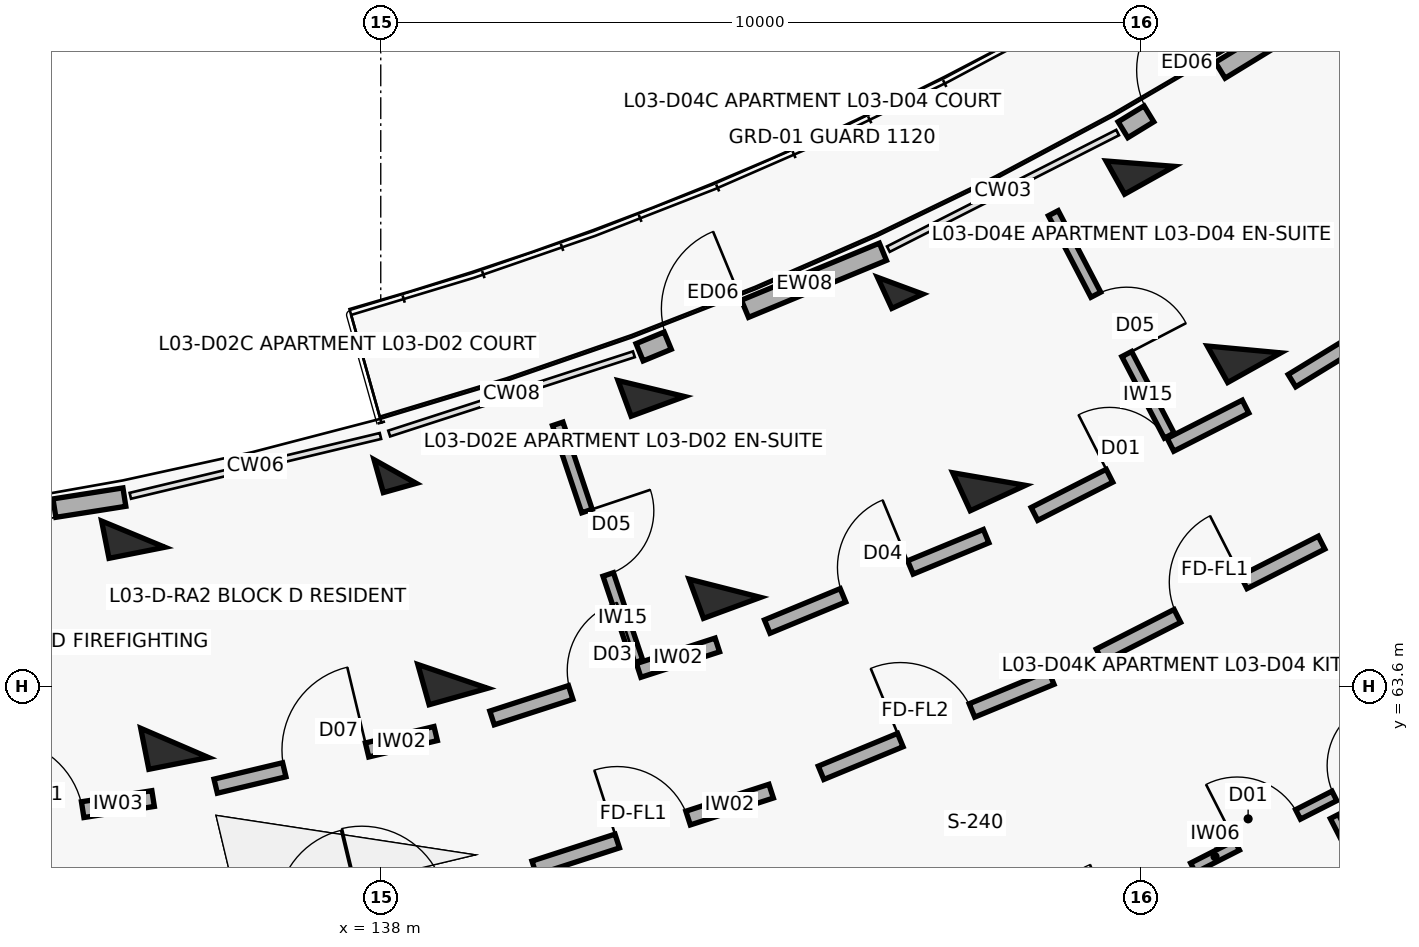
"""IFC4 building model, lengths in metres.
Left out: names, types, materials, properties, quantities, classifications, styles, units other than length and angle.
Written with IfcOpenShell. Run it as: python <this file> out.ifc"""

import sys

from ifc_helpers import new_model, si_unit, direction, frame, frame_2d, origin, origin_2d, place, context, subcontext, project, spatial, rectangle, extrude, element, fill, save


model = new_model("IFC4")
c1 = context("Model", 3, precision=1e-05, world=origin(), true_north=direction((0.0, 1.0)))
c2 = subcontext(c1, "Body", "Model", "MODEL_VIEW")
j1 = project(units=[si_unit("LENGTHUNIT", "METRE"), si_unit("PLANEANGLEUNIT", "RADIAN")], contexts=[c1])
p1 = place(None, origin())
s1 = spatial("IfcSite", under=j1, at=p1, CompositionType="ELEMENT")
p2 = place(p1, origin())
s2 = spatial("IfcBuilding", under=s1, at=p2, CompositionType="ELEMENT")
p3 = place(p2, frame((0.0, 0.0, 11.2)))
s3 = spatial("IfcBuildingStorey", under=s2, at=p3, CompositionType="ELEMENT", Elevation=11.2)
p4 = place(p3, frame((134.744, 65.599, 0.0), z_axis=(0.0, 0.0, 1.0), x_axis=(0.19423435122, -0.980955155349, 0.0)))
e1 = element("IfcColumn", 1, at=p4, inside=s3, PredefinedType="COLUMN", context=c2, shape_type="SweptSolid", body=[
    extrude(rectangle(XDim=0.5, YDim=0.75, at=origin_2d()), origin(), (0.0, 0.0, 1.0), 3.1),
])
p5 = place(p3, frame((135.288, 62.853, 0.0), z_axis=(0.0, 0.0, 1.0), x_axis=(0.19423435122, -0.980955155349, 0.0)))
e2 = element("IfcColumn", 2, at=p5, inside=s3, PredefinedType="COLUMN", context=c2, shape_type="SweptSolid", body=[
    extrude(rectangle(XDim=0.55, YDim=0.8, at=origin_2d()), origin(), (0.0, 0.0, 1.0), 3.1),
])
p6 = place(p3, frame((138.189, 66.423, 0.0), z_axis=(0.0, 0.0, 1.0), x_axis=(0.270600445976, -0.962691746426, 0.0)))
e3 = element("IfcColumn", 3, at=p6, inside=s3, PredefinedType="COLUMN", context=c2, shape_type="SweptSolid", body=[
    extrude(rectangle(XDim=0.45, YDim=0.45, at=origin_2d()), origin(), (0.0, 0.0, 1.0), 3.1),
])
p7 = place(p3, frame((138.947, 63.728, 0.0), z_axis=(0.0, 0.0, 1.0), x_axis=(0.270600445976, -0.962691746426, 0.0)))
e4 = element("IfcColumn", 4, at=p7, inside=s3, PredefinedType="COLUMN", context=c2, shape_type="SweptSolid", body=[
    extrude(rectangle(XDim=0.55, YDim=0.8, at=origin_2d()), origin(), (0.0, 0.0, 1.0), 3.1),
])
p8 = place(p3, frame((141.56, 67.515, 0.0), z_axis=(0.0, 0.0, 1.0), x_axis=(0.345298198999, -0.93849302276, 0.0)))
e5 = element("IfcColumn", 5, at=p8, inside=s3, PredefinedType="COLUMN", context=c2, shape_type="SweptSolid", body=[
    extrude(rectangle(XDim=0.5, YDim=0.75, at=origin_2d()), origin(), (0.0, 0.0, 1.0), 3.1),
])
p9 = place(p3, frame((142.527, 64.887, 0.0), z_axis=(0.0, 0.0, 1.0), x_axis=(0.345298198999, -0.93849302276, 0.0)))
e6 = element("IfcColumn", 6, at=p9, inside=s3, PredefinedType="COLUMN", context=c2, shape_type="SweptSolid", body=[
    extrude(rectangle(XDim=0.55, YDim=0.8, at=origin_2d()), origin(), (0.0, 0.0, 1.0), 3.1),
])
p10 = place(p3, frame((144.834, 68.868, 0.0), z_axis=(0.0, 0.0, 1.0), x_axis=(0.417867073801, -0.908508177527, 0.0)))
e7 = element("IfcColumn", 7, at=p10, inside=s3, PredefinedType="COLUMN", context=c2, shape_type="SweptSolid", body=[
    extrude(rectangle(XDim=0.45, YDim=0.45, at=origin_2d()), origin(), (0.0, 0.0, 1.0), 3.1),
])
for number, where, z_axis, x_axis in (
    (8, (146.004, 66.324, 0.0), (0.0, 0.0, 1.0), (0.418, -0.909, 0.0)),
    (9, (148.461, 60.982, 0.0), (0.0, 0.0, 1.0), (0.418, -0.909, 0.0)),
):
    element("IfcColumn", number, at=place(p3, frame(where, z_axis=z_axis, x_axis=x_axis)), inside=s3, PredefinedType="COLUMN", context=c2, shape_type="SweptSolid", body=[
        extrude(rectangle(XDim=0.55, YDim=0.8, at=origin_2d()), origin(), (0.0, 0.0, 1.0), 3.1),
    ])
p11 = place(p3, frame((147.992, 70.474, 0.0), z_axis=(0.0, 0.0, 1.0), x_axis=(0.487859659139, -0.87292207727, 0.0)))
e10 = element("IfcColumn", 10, at=p11, inside=s3, PredefinedType="COLUMN", context=c2, shape_type="SweptSolid", body=[
    extrude(rectangle(XDim=0.5, YDim=0.75, at=origin_2d()), origin(), (0.0, 0.0, 1.0), 3.1),
])
p12 = place(p3, frame((149.358, 68.03, 0.0), z_axis=(0.0, 0.0, 1.0), x_axis=(0.487859659139, -0.87292207727, 0.0)))
e11 = element("IfcColumn", 11, at=p12, inside=s3, PredefinedType="COLUMN", context=c2, shape_type="SweptSolid", body=[
    extrude(rectangle(XDim=0.55, YDim=0.8, at=origin_2d()), origin(), (0.0, 0.0, 1.0), 3.1),
])
p13 = place(p3, frame((131.206, 65.548, 0.0), z_axis=(0.0, 0.0, 1.0), x_axis=(0.987825183084, 0.155568016203, 0.0)))
e12 = element("IfcWall", 12, at=p13, inside=s3, PredefinedType="SOLIDWALL", context=c2, shape_type="SweptSolid", body=[
    extrude(rectangle(XDim=3.464, YDim=0.245, at=frame_2d((1.732, 0.0))), origin(), (0.0, 0.0, 1.0), 2.25),
])
p14 = place(p13, frame((0.932, 0.0, 0.32)))
e13 = element("IfcOpeningElement", 13, at=p14, cuts=e12, PredefinedType="OPENING", context=c2, shape_type="SweptSolid", body=[
    extrude(rectangle(XDim=1.6, YDim=1.5, at=frame_2d((0.8, 0.75))), frame((0.0, 0.133, 0.0), z_axis=(0.0, -1.0, 0.0), x_axis=(1.0, 0.0, 0.0)), (0.0, 0.0, 1.0), 0.265),
])
p15 = place(p3, frame((141.406, 67.992, 0.0), z_axis=(0.0, 0.0, 1.0), x_axis=(0.924221949388, 0.381855716561, 0.0)))
e14 = element("IfcWall", 14, at=p15, inside=s3, PredefinedType="SOLIDWALL", context=c2, shape_type="SweptSolid", body=[
    extrude(rectangle(XDim=3.463, YDim=0.245, at=frame_2d((1.732, 0.0))), origin(), (0.0, 0.0, 1.0), 2.25),
])
p16 = place(p15, frame((0.4, 0.0, 0.0)))
e15 = element("IfcOpeningElement", 15, at=p16, cuts=e14, PredefinedType="OPENING", context=c2, shape_type="SweptSolid", body=[
    extrude(rectangle(XDim=1.1, YDim=2.15, at=frame_2d((0.55, 1.075))), frame((0.0, 0.133, 0.0), z_axis=(0.0, -1.0, 0.0), x_axis=(1.0, 0.0, 0.0)), (0.0, 0.0, 1.0), 0.265),
])
p17 = place(p3, frame((147.765, 70.921, 0.0), z_axis=(0.0, 0.0, 1.0), x_axis=(0.85310231885, 0.521743647371, 0.0)))
e16 = element("IfcWall", 16, at=p17, inside=s3, PredefinedType="SOLIDWALL", context=c2, shape_type="SweptSolid", body=[
    extrude(rectangle(XDim=3.464, YDim=0.245, at=frame_2d((1.732, 0.0))), origin(), (0.0, 0.0, 1.0), 2.25),
])
p18 = place(p17, frame((0.4, 0.0, 0.0)))
e17 = element("IfcOpeningElement", 17, at=p18, cuts=e16, PredefinedType="OPENING", context=c2, shape_type="SweptSolid", body=[
    extrude(rectangle(XDim=1.1, YDim=2.15, at=frame_2d((0.55, 1.075))), frame((0.0, 0.133, 0.0), z_axis=(0.0, -1.0, 0.0), x_axis=(1.0, 0.0, 0.0)), (0.0, 0.0, 1.0), 0.265),
])
p19 = place(p3, frame((132.065, 61.657, 0.0), z_axis=(0.0, 0.0, 1.0), x_axis=(0.987816121487, 0.155625544594, 0.0)))
e18 = element("IfcWall", 18, at=p19, inside=s3, PredefinedType="SOLIDWALL", context=c2, shape_type="SweptSolid", body=[
    extrude(rectangle(XDim=2.976, YDim=0.21, at=frame_2d((1.488, 0.0))), origin(), (0.0, 0.0, 1.0), 2.08),
])
p20 = place(p19, frame((0.938, 0.0, 0.0)))
e19 = element("IfcOpeningElement", 19, at=p20, cuts=e18, PredefinedType="OPENING", context=c2, shape_type="SweptSolid", body=[
    extrude(rectangle(XDim=1.1, YDim=2.15, at=frame_2d((0.55, 1.075))), frame((0.0, 0.115, 0.0), z_axis=(0.0, -1.0, 0.0), x_axis=(1.0, 0.0, 0.0)), (0.0, 0.0, 1.0), 0.23),
])
p21 = place(p3, frame((135.828, 62.283, 0.0), z_axis=(0.0, 0.0, 1.0), x_axis=(0.972558314217, 0.232659247501, 0.0)))
e20 = element("IfcWall", 20, at=p21, inside=s3, PredefinedType="SOLIDWALL", context=c2, shape_type="SweptSolid", body=[
    extrude(rectangle(XDim=2.976, YDim=0.19, at=frame_2d((1.488, 0.0))), origin(), (0.0, 0.0, 1.0), 2.08),
])
p22 = place(p21, frame((0.928, 0.0, 0.0)))
e21 = element("IfcOpeningElement", 21, at=p22, cuts=e20, PredefinedType="OPENING", context=c2, shape_type="SweptSolid", body=[
    extrude(rectangle(XDim=1.12, YDim=2.15, at=frame_2d((0.56, 1.075))), frame((0.0, 0.105, 0.0), z_axis=(0.0, -1.0, 0.0), x_axis=(1.0, 0.0, 0.0)), (0.0, 0.0, 1.0), 0.21),
])
p23 = place(p3, frame((140.019, 61.208, 0.0), z_axis=(0.0, 0.0, 1.0), x_axis=(0.951323803878, 0.308193154005, 0.0)))
e22 = element("IfcWall", 22, at=p23, inside=s3, PredefinedType="SOLIDWALL", context=c2, shape_type="SweptSolid", body=[
    extrude(rectangle(XDim=3.277, YDim=0.19, at=frame_2d((1.639, 0.0))), origin(), (0.0, 0.0, 1.0), 2.08),
])
p24 = place(p23, frame((1.148, 0.0, 0.0)))
e23 = element("IfcOpeningElement", 23, at=p24, cuts=e22, PredefinedType="OPENING", context=c2, shape_type="SweptSolid", body=[
    extrude(rectangle(XDim=0.98, YDim=2.15, at=frame_2d((0.49, 1.075))), frame((0.0, 0.105, 0.0), z_axis=(0.0, -1.0, 0.0), x_axis=(1.0, 0.0, 0.0)), (0.0, 0.0, 1.0), 0.21),
])
p25 = place(p3, frame((139.464, 63.181, 0.0), z_axis=(0.0, 0.0, 1.0), x_axis=(0.951336474448, 0.308154040027, 0.0)))
e24 = element("IfcWall", 24, at=p25, inside=s3, PredefinedType="SOLIDWALL", context=c2, shape_type="SweptSolid", body=[
    extrude(rectangle(XDim=3.116, YDim=0.19, at=frame_2d((1.558, 0.0))), origin(), (0.0, 0.0, 1.0), 2.08),
])
p26 = place(p25, frame((1.088, 0.0, 0.0)))
e25 = element("IfcOpeningElement", 25, at=p26, cuts=e24, PredefinedType="OPENING", context=c2, shape_type="SweptSolid", body=[
    extrude(rectangle(XDim=0.94, YDim=2.1, at=frame_2d((0.47, 1.05))), frame((0.0, 0.105, 0.0), z_axis=(0.0, -1.0, 0.0), x_axis=(1.0, 0.0, 0.0)), (0.0, 0.0, 1.0), 0.21),
])
p27 = place(p3, frame((140.328, 67.051, 0.0), z_axis=(0.0, 0.0, 1.0), x_axis=(0.317825321803, -0.948149284038, 0.0)))
e26 = element("IfcWall", 26, at=p27, inside=s3, PredefinedType="PARTITIONING", context=c2, shape_type="SweptSolid", body=[
    extrude(rectangle(XDim=3.3, YDim=0.145, at=frame_2d((1.65, 0.0))), origin(), (0.0, 0.0, 1.0), 2.08),
])
p28 = place(p27, frame((1.21, 0.0, 0.0)))
e27 = element("IfcOpeningElement", 27, at=p28, cuts=e26, PredefinedType="OPENING", context=c2, shape_type="SweptSolid", body=[
    extrude(rectangle(XDim=0.88, YDim=2.1, at=frame_2d((0.44, 1.05))), frame((0.0, 0.083, 0.0), z_axis=(0.0, -1.0, 0.0), x_axis=(1.0, 0.0, 0.0)), (0.0, 0.0, 1.0), 0.165),
])
p29 = place(p3, frame((143.793, 62.459, 0.0), z_axis=(0.0, 0.0, 1.0), x_axis=(0.924214561665, 0.381873596896, 0.0)))
e28 = element("IfcWall", 28, at=p29, inside=s3, PredefinedType="SOLIDWALL", context=c2, shape_type="SweptSolid", body=[
    extrude(rectangle(XDim=3.277, YDim=0.19, at=frame_2d((1.639, 0.0))), origin(), (0.0, 0.0, 1.0), 2.08),
])
p30 = place(p29, frame((1.128, 0.0, 0.0)))
e29 = element("IfcOpeningElement", 29, at=p30, cuts=e28, PredefinedType="OPENING", context=c2, shape_type="SweptSolid", body=[
    extrude(rectangle(XDim=1.02, YDim=2.15, at=frame_2d((0.51, 1.075))), frame((0.0, 0.105, 0.0), z_axis=(0.0, -1.0, 0.0), x_axis=(1.0, 0.0, 0.0)), (0.0, 0.0, 1.0), 0.21),
])
p31 = place(p3, frame((143.085, 64.383, 0.0), z_axis=(0.0, 0.0, 1.0), x_axis=(0.924213340202, 0.381876553081, 0.0)))
e30 = element("IfcWall", 30, at=p31, inside=s3, PredefinedType="SOLIDWALL", context=c2, shape_type="SweptSolid", body=[
    extrude(rectangle(XDim=3.116, YDim=0.19, at=frame_2d((1.558, 0.0))), origin(), (0.0, 0.0, 1.0), 2.08),
])
p32 = place(p31, frame((1.078, 0.0, 0.0)))
e31 = element("IfcOpeningElement", 31, at=p32, cuts=e30, PredefinedType="OPENING", context=c2, shape_type="SweptSolid", body=[
    extrude(rectangle(XDim=0.96, YDim=2.1, at=frame_2d((0.48, 1.05))), frame((0.0, 0.105, 0.0), z_axis=(0.0, -1.0, 0.0), x_axis=(1.0, 0.0, 0.0)), (0.0, 0.0, 1.0), 0.21),
])
p33 = place(p3, frame((147.457, 64.003, 0.0), z_axis=(0.0, 0.0, 1.0), x_axis=(0.891412167565, 0.45319349898, 0.0)))
e32 = element("IfcWall", 32, at=p33, inside=s3, PredefinedType="SOLIDWALL", context=c2, shape_type="SweptSolid", body=[
    extrude(rectangle(XDim=3.277, YDim=0.19, at=frame_2d((1.639, 0.0))), origin(), (0.0, 0.0, 1.0), 2.08),
])
p34 = place(p33, frame((1.148, 0.0, 0.0)))
e33 = element("IfcOpeningElement", 33, at=p34, cuts=e32, PredefinedType="OPENING", context=c2, shape_type="SweptSolid", body=[
    extrude(rectangle(XDim=0.98, YDim=2.15, at=frame_2d((0.49, 1.075))), frame((0.0, 0.105, 0.0), z_axis=(0.0, -1.0, 0.0), x_axis=(1.0, 0.0, 0.0)), (0.0, 0.0, 1.0), 0.21),
])
p35 = place(p3, frame((146.6, 65.865, 0.0), z_axis=(0.0, 0.0, 1.0), x_axis=(0.891414101388, 0.453189695212, 0.0)))
e34 = element("IfcWall", 34, at=p35, inside=s3, PredefinedType="SOLIDWALL", context=c2, shape_type="SweptSolid", body=[
    extrude(rectangle(XDim=3.116, YDim=0.19, at=frame_2d((1.558, 0.0))), origin(), (0.0, 0.0, 1.0), 2.08),
])
p36 = place(p35, frame((1.108, 0.0, 0.0)))
e35 = element("IfcOpeningElement", 35, at=p36, cuts=e34, PredefinedType="OPENING", context=c2, shape_type="SweptSolid", body=[
    extrude(rectangle(XDim=0.9, YDim=2.1, at=frame_2d((0.45, 1.05))), frame((0.0, 0.105, 0.0), z_axis=(0.0, -1.0, 0.0), x_axis=(1.0, 0.0, 0.0)), (0.0, 0.0, 1.0), 0.21),
])
p37 = place(p3, frame((146.849, 69.822, 0.0), z_axis=(0.0, 0.0, 1.0), x_axis=(0.462242343884, -0.886753638572, 0.0)))
e36 = element("IfcWall", 36, at=p37, inside=s3, PredefinedType="PARTITIONING", context=c2, shape_type="SweptSolid", body=[
    extrude(rectangle(XDim=3.3, YDim=0.145, at=frame_2d((1.65, 0.0))), origin(), (0.0, 0.0, 1.0), 2.08),
])
p38 = place(p37, frame((1.21, 0.0, 0.0)))
e37 = element("IfcOpeningElement", 37, at=p38, cuts=e36, PredefinedType="OPENING", context=c2, shape_type="SweptSolid", body=[
    extrude(rectangle(XDim=0.88, YDim=2.1, at=frame_2d((0.44, 1.05))), frame((0.0, 0.083, 0.0), z_axis=(0.0, -1.0, 0.0), x_axis=(1.0, 0.0, 0.0)), (0.0, 0.0, 1.0), 0.165),
])
p39 = place(p3, frame((148.687, 61.209, 0.0), z_axis=(0.0, 0.0, 1.0), x_axis=(0.891396224028, 0.453224857866, 0.0)))
e38 = element("IfcWall", 38, at=p39, inside=s3, PredefinedType="PARTITIONING", context=c2, shape_type="SweptSolid", body=[
    extrude(rectangle(XDim=3.617, YDim=0.14, at=frame_2d((1.808, 0.0))), origin(), (0.0, 0.0, 1.0), 2.08),
])
p40 = place(p39, frame((0.65, 0.0, 0.0)))
e39 = element("IfcOpeningElement", 39, at=p40, cuts=e38, PredefinedType="OPENING", context=c2, shape_type="SweptSolid", body=[
    extrude(rectangle(XDim=0.9, YDim=2.1, at=frame_2d((0.45, 1.05))), frame((0.0, 0.08, 0.0), z_axis=(0.0, -1.0, 0.0), x_axis=(1.0, 0.0, 0.0)), (0.0, 0.0, 1.0), 0.16),
])
p41 = place(p39, frame((2.086, 0.0, 0.0)))
e40 = element("IfcOpeningElement", 40, at=p41, cuts=e38, PredefinedType="OPENING", context=c2, shape_type="SweptSolid", body=[
    extrude(rectangle(XDim=0.88, YDim=2.1, at=frame_2d((0.44, 1.05))), frame((0.0, 0.08, 0.0), z_axis=(0.0, -1.0, 0.0), x_axis=(1.0, 0.0, 0.0)), (0.0, 0.0, 1.0), 0.16),
])
p42 = place(p3, frame((150.547, 61.884, 0.0), z_axis=(0.0, 0.0, 1.0), x_axis=(0.455778725258, -0.89009311513, 0.0)))
e41 = element("IfcWall", 41, at=p42, inside=s3, PredefinedType="PARTITIONING", context=c2, shape_type="SweptSolid", body=[
    extrude(rectangle(XDim=5.05, YDim=0.12, at=frame_2d((2.525, 0.0))), origin(), (0.0, 0.0, 1.0), 2.08),
])
p43 = place(p42, frame((2.08, 0.0, 0.0)))
e42 = element("IfcOpeningElement", 42, at=p43, cuts=e41, PredefinedType="OPENING", context=c2, shape_type="SweptSolid", body=[
    extrude(rectangle(XDim=0.89, YDim=2.1, at=frame_2d((0.445, 1.05))), frame((0.0, 0.07, 0.0), z_axis=(0.0, -1.0, 0.0), x_axis=(1.0, 0.0, 0.0)), (0.0, 0.0, 1.0), 0.14),
])
p44 = place(p3, frame((149.989, 67.619, 0.0), z_axis=(0.0, 0.0, 1.0), x_axis=(0.853121049608, 0.5217130195, 0.0)))
e43 = element("IfcWall", 43, at=p44, inside=s3, PredefinedType="SOLIDWALL", context=c2, shape_type="SweptSolid", body=[
    extrude(rectangle(XDim=3.116, YDim=0.19, at=frame_2d((1.558, 0.0))), origin(), (0.0, 0.0, 1.0), 2.08),
])
p45 = place(p44, frame((1.098, 0.0, 0.0)))
e44 = element("IfcOpeningElement", 44, at=p45, cuts=e43, PredefinedType="OPENING", context=c2, shape_type="SweptSolid", body=[
    extrude(rectangle(XDim=0.92, YDim=2.1, at=frame_2d((0.46, 1.05))), frame((0.0, 0.105, 0.0), z_axis=(0.0, -1.0, 0.0), x_axis=(1.0, 0.0, 0.0)), (0.0, 0.0, 1.0), 0.21),
])
p46 = place(p14, origin())
e45 = element("IfcWindow", 45, at=p46, inside=s3, PartitioningType="DOUBLE_PANEL_VERTICAL", PredefinedType="WINDOW", context=c2, shape_type="SweptSolid", body=[
    extrude(rectangle(XDim=1.6, YDim=1.5, at=frame_2d((0.8, 0.75))), frame((0.0, 0.03, 0.0), z_axis=(0.0, -1.0, 0.0), x_axis=(1.0, 0.0, 0.0)), (0.0, 0.0, 1.0), 0.06),
])
fill(e13, e45)
p47 = place(p16, origin())
e46 = element("IfcDoor", 46, at=p47, inside=s3, OperationType="SINGLE_SWING_RIGHT", PredefinedType="DOOR", context=c2, shape_type="SweptSolid", body=[
    extrude(rectangle(XDim=1.1, YDim=2.15, at=frame_2d((0.55, 1.075))), frame((0.0, 0.025, 0.0), z_axis=(0.0, -1.0, 0.0), x_axis=(1.0, 0.0, 0.0)), (0.0, 0.0, 1.0), 0.05),
])
fill(e15, e46)
p48 = place(p18, origin())
e47 = element("IfcDoor", 47, at=p48, inside=s3, OperationType="SINGLE_SWING_RIGHT", PredefinedType="DOOR", context=c2, shape_type="SweptSolid", body=[
    extrude(rectangle(XDim=1.1, YDim=2.15, at=frame_2d((0.55, 1.075))), frame((0.0, 0.025, 0.0), z_axis=(0.0, -1.0, 0.0), x_axis=(1.0, 0.0, 0.0)), (0.0, 0.0, 1.0), 0.05),
])
fill(e17, e47)
p49 = place(p20, origin())
e48 = element("IfcDoor", 48, at=p49, inside=s3, OperationType="SINGLE_SWING_LEFT", PredefinedType="DOOR", context=c2, shape_type="SweptSolid", body=[
    extrude(rectangle(XDim=1.1, YDim=2.15, at=frame_2d((0.55, 1.075))), frame((0.0, 0.025, 0.0), z_axis=(0.0, -1.0, 0.0), x_axis=(1.0, 0.0, 0.0)), (0.0, 0.0, 1.0), 0.05),
])
fill(e19, e48)
p50 = place(p22, origin())
e49 = element("IfcDoor", 49, at=p50, inside=s3, OperationType="SINGLE_SWING_RIGHT", PredefinedType="DOOR", context=c2, shape_type="SweptSolid", body=[
    extrude(rectangle(XDim=1.12, YDim=2.15, at=frame_2d((0.56, 1.075))), frame((0.0, 0.025, 0.0), z_axis=(0.0, -1.0, 0.0), x_axis=(1.0, 0.0, 0.0)), (0.0, 0.0, 1.0), 0.05),
])
fill(e21, e49)
p51 = place(p24, origin())
e50 = element("IfcDoor", 50, at=p51, inside=s3, OperationType="SINGLE_SWING_LEFT", PredefinedType="DOOR", context=c2, shape_type="SweptSolid", body=[
    extrude(rectangle(XDim=0.98, YDim=2.15, at=frame_2d((0.49, 1.075))), frame((0.0, 0.025, 0.0), z_axis=(0.0, -1.0, 0.0), x_axis=(1.0, 0.0, 0.0)), (0.0, 0.0, 1.0), 0.05),
])
fill(e23, e50)
p52 = place(p26, origin())
e51 = element("IfcDoor", 51, at=p52, inside=s3, OperationType="SINGLE_SWING_RIGHT", PredefinedType="DOOR", context=c2, shape_type="SweptSolid", body=[
    extrude(rectangle(XDim=0.94, YDim=2.1, at=frame_2d((0.47, 1.05))), frame((0.0, 0.025, 0.0), z_axis=(0.0, -1.0, 0.0), x_axis=(1.0, 0.0, 0.0)), (0.0, 0.0, 1.0), 0.05),
])
fill(e25, e51)
p53 = place(p28, origin())
e52 = element("IfcDoor", 52, at=p53, inside=s3, OperationType="SINGLE_SWING_LEFT", PredefinedType="DOOR", context=c2, shape_type="SweptSolid", body=[
    extrude(rectangle(XDim=0.88, YDim=2.1, at=frame_2d((0.44, 1.05))), frame((0.0, 0.025, 0.0), z_axis=(0.0, -1.0, 0.0), x_axis=(1.0, 0.0, 0.0)), (0.0, 0.0, 1.0), 0.05),
])
fill(e27, e52)
p54 = place(p30, origin())
e53 = element("IfcDoor", 53, at=p54, inside=s3, OperationType="SINGLE_SWING_LEFT", PredefinedType="DOOR", context=c2, shape_type="SweptSolid", body=[
    extrude(rectangle(XDim=1.02, YDim=2.15, at=frame_2d((0.51, 1.075))), frame((0.0, 0.025, 0.0), z_axis=(0.0, -1.0, 0.0), x_axis=(1.0, 0.0, 0.0)), (0.0, 0.0, 1.0), 0.05),
])
fill(e29, e53)
p55 = place(p32, origin())
e54 = element("IfcDoor", 54, at=p55, inside=s3, OperationType="SINGLE_SWING_RIGHT", PredefinedType="DOOR", context=c2, shape_type="SweptSolid", body=[
    extrude(rectangle(XDim=0.96, YDim=2.1, at=frame_2d((0.48, 1.05))), frame((0.0, 0.025, 0.0), z_axis=(0.0, -1.0, 0.0), x_axis=(1.0, 0.0, 0.0)), (0.0, 0.0, 1.0), 0.05),
])
fill(e31, e54)
p56 = place(p34, origin())
e55 = element("IfcDoor", 55, at=p56, inside=s3, OperationType="SINGLE_SWING_RIGHT", PredefinedType="DOOR", context=c2, shape_type="SweptSolid", body=[
    extrude(rectangle(XDim=0.98, YDim=2.15, at=frame_2d((0.49, 1.075))), frame((0.0, 0.025, 0.0), z_axis=(0.0, -1.0, 0.0), x_axis=(1.0, 0.0, 0.0)), (0.0, 0.0, 1.0), 0.05),
])
fill(e33, e55)
p57 = place(p36, origin())
e56 = element("IfcDoor", 56, at=p57, inside=s3, OperationType="SINGLE_SWING_LEFT", PredefinedType="DOOR", context=c2, shape_type="SweptSolid", body=[
    extrude(rectangle(XDim=0.9, YDim=2.1, at=frame_2d((0.45, 1.05))), frame((0.0, 0.025, 0.0), z_axis=(0.0, -1.0, 0.0), x_axis=(1.0, 0.0, 0.0)), (0.0, 0.0, 1.0), 0.05),
])
fill(e35, e56)
p58 = place(p38, origin())
e57 = element("IfcDoor", 57, at=p58, inside=s3, OperationType="SINGLE_SWING_RIGHT", PredefinedType="DOOR", context=c2, shape_type="SweptSolid", body=[
    extrude(rectangle(XDim=0.88, YDim=2.1, at=frame_2d((0.44, 1.05))), frame((0.0, 0.025, 0.0), z_axis=(0.0, -1.0, 0.0), x_axis=(1.0, 0.0, 0.0)), (0.0, 0.0, 1.0), 0.05),
])
fill(e37, e57)
p59 = place(p40, origin())
e58 = element("IfcDoor", 58, at=p59, inside=s3, OperationType="SINGLE_SWING_LEFT", PredefinedType="DOOR", context=c2, shape_type="SweptSolid", body=[
    extrude(rectangle(XDim=0.9, YDim=2.1, at=frame_2d((0.45, 1.05))), frame((0.0, 0.025, 0.0), z_axis=(0.0, -1.0, 0.0), x_axis=(1.0, 0.0, 0.0)), (0.0, 0.0, 1.0), 0.05),
])
fill(e39, e58)
p60 = place(p41, origin())
e59 = element("IfcDoor", 59, at=p60, inside=s3, OperationType="SINGLE_SWING_RIGHT", PredefinedType="DOOR", context=c2, shape_type="SweptSolid", body=[
    extrude(rectangle(XDim=0.88, YDim=2.1, at=frame_2d((0.44, 1.05))), frame((0.0, 0.025, 0.0), z_axis=(0.0, -1.0, 0.0), x_axis=(1.0, 0.0, 0.0)), (0.0, 0.0, 1.0), 0.05),
])
fill(e40, e59)
save(model, sys.argv[1])
